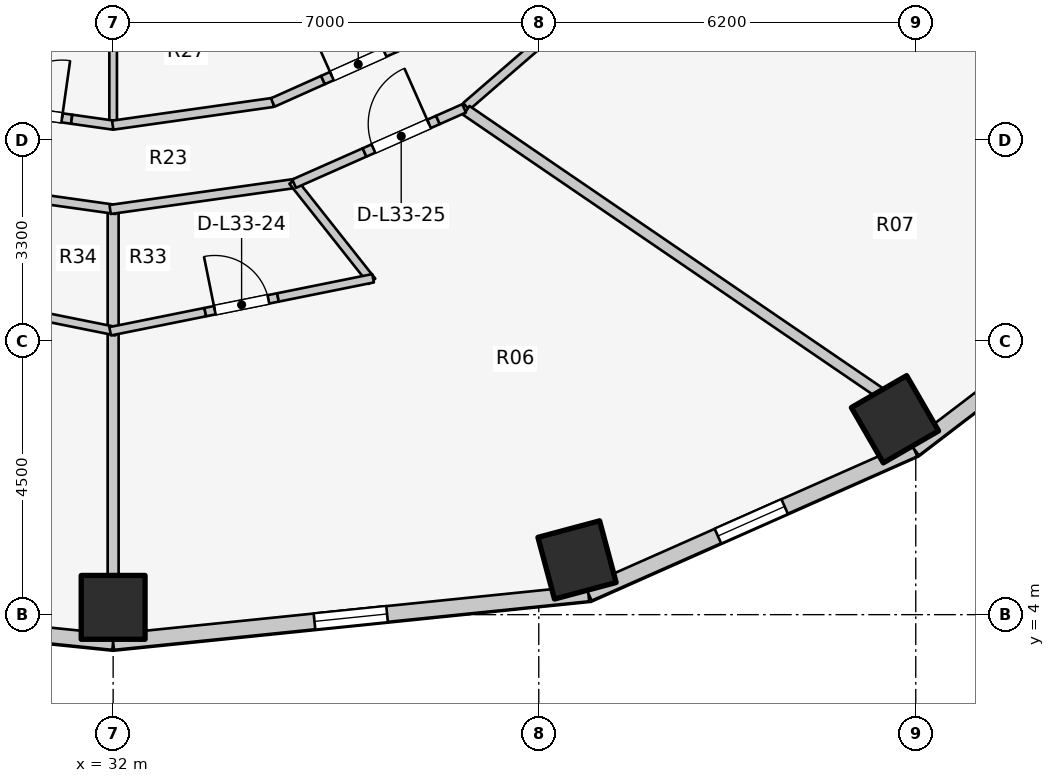
"""IFC4 building model, lengths in metres.
Left out: names, types, materials, properties, quantities, classifications, styles, units other than length and angle.
Written with IfcOpenShell. Run it as: python <this file> out.ifc"""

import sys

from ifc_helpers import new_model, si_unit, direction, frame, frame_2d, origin, origin_2d, place, context, subcontext, project, spatial, rectangle, extrude, element, fill, save


model = new_model("IFC4")
c1 = context("Model", 3, precision=1e-05, world=origin(), true_north=direction((0.0, 1.0)))
c2 = subcontext(c1, "Body", "Model", "MODEL_VIEW")
j1 = project(units=[si_unit("LENGTHUNIT", "METRE"), si_unit("PLANEANGLEUNIT", "RADIAN")], contexts=[c1])
p1 = place(None, origin())
s1 = spatial("IfcSite", under=j1, at=p1, CompositionType="ELEMENT")
p2 = place(p1, origin())
s2 = spatial("IfcBuilding", under=s1, at=p2, CompositionType="ELEMENT")
p3 = place(p2, frame((0.0, 0.0, 110.4)))
s3 = spatial("IfcBuildingStorey", under=s2, at=p3, CompositionType="ELEMENT", Elevation=110.4)
for number, where, z_axis, x_axis in (
    (1, (32.0, 4.12, 0.0), (0.0, 0.0, 1.0), (0.0, -1.0, 0.0)),
    (2, (39.629, 4.9, 0.0), (0.0, 0.0, 1.0), (0.259, -0.966, 0.0)),
    (3, (44.858, 7.214, 0.0), (0.0, 0.0, 1.0), (0.5, -0.866, 0.0)),
):
    element("IfcColumn", number, at=place(p3, frame(where, z_axis=z_axis, x_axis=x_axis)), inside=s3, PredefinedType="COLUMN", context=c2, shape_type="SweptSolid", body=[
        extrude(rectangle(XDim=1.05, YDim=1.05, at=origin_2d()), origin(), (0.0, 0.0, 1.0), 3.1),
    ])
p4 = place(p3, frame((24.184, 4.349, 0.0), z_axis=(0.0, 0.0, 1.0), x_axis=(0.994821390558, -0.101638579726, 0.0)))
e4 = element("IfcWall", 4, at=p4, inside=s3, PredefinedType="STANDARD", context=c2, shape_type="SweptSolid", body=[
    extrude(rectangle(XDim=7.857, YDim=0.26, at=frame_2d((3.929, 0.0))), origin(), (0.0, 0.0, 1.0), 1.22),
])
p5 = place(p4, frame((3.329, 0.0, 0.15)))
e5 = element("IfcOpeningElement", 5, at=p5, cuts=e4, PredefinedType="OPENING", context=c2, shape_type="SweptSolid", body=[
    extrude(rectangle(XDim=1.2, YDim=0.9, at=frame_2d((0.6, 0.45))), frame((0.0, 0.14, 0.0), z_axis=(0.0, -1.0, 0.0), x_axis=(1.0, 0.0, 0.0)), (0.0, 0.0, 1.0), 0.28),
])
p6 = place(p3, frame((32.0, 3.551, 0.0), z_axis=(0.0, 0.0, 1.0), x_axis=(0.994821390558, 0.101638579726, 0.0)))
e6 = element("IfcWall", 6, at=p6, inside=s3, PredefinedType="STANDARD", context=c2, shape_type="SweptSolid", body=[
    extrude(rectangle(XDim=7.857, YDim=0.26, at=frame_2d((3.929, 0.0))), origin(), (0.0, 0.0, 1.0), 1.22),
])
p7 = place(p6, frame((3.329, 0.0, 0.15)))
e7 = element("IfcOpeningElement", 7, at=p7, cuts=e6, PredefinedType="OPENING", context=c2, shape_type="SweptSolid", body=[
    extrude(rectangle(XDim=1.2, YDim=0.9, at=frame_2d((0.6, 0.45))), frame((0.0, 0.14, 0.0), z_axis=(0.0, -1.0, 0.0), x_axis=(1.0, 0.0, 0.0)), (0.0, 0.0, 1.0), 0.28),
])
p8 = place(p3, frame((39.816, 4.349, 0.0), z_axis=(0.0, 0.0, 1.0), x_axis=(0.914336605747, 0.404955023911, 0.0)))
e8 = element("IfcWall", 8, at=p8, inside=s3, PredefinedType="STANDARD", context=c2, shape_type="SweptSolid", body=[
    extrude(rectangle(XDim=5.859, YDim=0.26, at=frame_2d((2.929, 0.0))), origin(), (0.0, 0.0, 1.0), 1.22),
])
p9 = place(p8, frame((2.329, 0.0, 0.15)))
e9 = element("IfcOpeningElement", 9, at=p9, cuts=e8, PredefinedType="OPENING", context=c2, shape_type="SweptSolid", body=[
    extrude(rectangle(XDim=1.2, YDim=0.9, at=frame_2d((0.6, 0.45))), frame((0.0, 0.14, 0.0), z_axis=(0.0, -1.0, 0.0), x_axis=(1.0, 0.0, 0.0)), (0.0, 0.0, 1.0), 0.28),
])
p10 = place(p3, frame((45.173, 6.722, 0.0), z_axis=(0.0, 0.0, 1.0), x_axis=(0.794809810864, 0.606858603427, 0.0)))
e10 = element("IfcWall", 10, at=p10, inside=s3, PredefinedType="STANDARD", context=c2, shape_type="SweptSolid", body=[
    extrude(rectangle(XDim=5.149, YDim=0.26, at=frame_2d((2.575, 0.0))), origin(), (0.0, 0.0, 1.0), 1.22),
])
p11 = place(p3, frame((37.807, 12.358, 0.0), z_axis=(0.0, 0.0, 1.0), x_axis=(0.756055312247, 0.654507727092, 0.0)))
e11 = element("IfcWall", 11, at=p11, inside=s3, PredefinedType="PARTITIONING", context=c2, shape_type="SweptSolid", body=[
    extrude(rectangle(XDim=2.111, YDim=0.15, at=frame_2d((1.055, 0.0))), origin(), (0.0, 0.0, 1.0), 1.22),
])
p12 = place(p3, frame((32.0, 14.9, 0.0), z_axis=(0.0, 0.0, 1.0), x_axis=(0.0, -1.0, 0.0)))
e12 = element("IfcWall", 12, at=p12, inside=s3, PredefinedType="PARTITIONING", context=c2, shape_type="SweptSolid", body=[
    extrude(rectangle(XDim=2.85, YDim=0.125, at=frame_2d((1.425, 0.0))), origin(), (0.0, 0.0, 1.0), 1.22),
])
p13 = place(p3, frame((30.061, 12.326, 0.0), z_axis=(0.0, 0.0, 1.0), x_axis=(0.990102710588, -0.140344656064, 0.0)))
e13 = element("IfcWall", 13, at=p13, inside=s3, PredefinedType="PARTITIONING", context=c2, shape_type="SweptSolid", body=[
    extrude(rectangle(XDim=1.27, YDim=0.15, at=frame_2d((0.635, 0.0))), origin(), (0.0, 0.0, 1.0), 2.575),
])
p14 = place(p13, frame((0.16, 0.0, 0.0)))
e14 = element("IfcOpeningElement", 14, at=p14, cuts=e13, PredefinedType="OPENING", context=c2, shape_type="SweptSolid", body=[
    extrude(rectangle(XDim=0.95, YDim=2.1, at=frame_2d((0.475, 1.05))), frame((0.0, 0.085, 0.0), z_axis=(0.0, -1.0, 0.0), x_axis=(1.0, 0.0, 0.0)), (0.0, 0.0, 1.0), 0.17),
])
p15 = place(p3, frame((31.318, 12.148, 0.0), z_axis=(0.0, 0.0, 1.0), x_axis=(0.990110185172, -0.1402919143, 0.0)))
e15 = element("IfcWall", 15, at=p15, inside=s3, PredefinedType="PARTITIONING", context=c2, shape_type="SweptSolid", body=[
    extrude(rectangle(XDim=0.696, YDim=0.15, at=frame_2d((0.348, 0.0))), origin(), (0.0, 0.0, 1.0), 1.22),
])
p16 = place(p3, frame((31.993, 12.05, 0.0), z_axis=(0.0, 0.0, 1.0), x_axis=(0.990106619919, 0.140317073775, 0.0)))
e16 = element("IfcWall", 16, at=p16, inside=s3, PredefinedType="PARTITIONING", context=c2, shape_type="SweptSolid", body=[
    extrude(rectangle(XDim=2.662, YDim=0.15, at=frame_2d((1.331, 0.0))), origin(), (0.0, 0.0, 1.0), 1.22),
])
p17 = place(p3, frame((34.625, 12.423, 0.0), z_axis=(0.0, 0.0, 1.0), x_axis=(0.912863245368, 0.408265471546, 0.0)))
e17 = element("IfcWall", 17, at=p17, inside=s3, PredefinedType="PARTITIONING", context=c2, shape_type="SweptSolid", body=[
    extrude(rectangle(XDim=0.905, YDim=0.15, at=frame_2d((0.452, 0.0))), origin(), (0.0, 0.0, 1.0), 1.22),
])
p18 = place(p3, frame((35.451, 12.792, 0.0), z_axis=(0.0, 0.0, 1.0), x_axis=(0.91289745036, 0.408188982122, 0.0)))
e18 = element("IfcWall", 18, at=p18, inside=s3, PredefinedType="PARTITIONING", context=c2, shape_type="SweptSolid", body=[
    extrude(rectangle(XDim=1.27, YDim=0.15, at=frame_2d((0.635, 0.0))), origin(), (0.0, 0.0, 1.0), 2.16),
])
p19 = place(p18, frame((0.16, 0.0, 0.0)))
e19 = element("IfcOpeningElement", 19, at=p19, cuts=e18, PredefinedType="OPENING", context=c2, shape_type="SweptSolid", body=[
    extrude(rectangle(XDim=0.95, YDim=2.1, at=frame_2d((0.475, 1.05))), frame((0.0, 0.085, 0.0), z_axis=(0.0, -1.0, 0.0), x_axis=(1.0, 0.0, 0.0)), (0.0, 0.0, 1.0), 0.17),
])
p20 = place(p3, frame((36.61, 13.31, 0.0), z_axis=(0.0, 0.0, 1.0), x_axis=(0.912911125305, 0.40815839731, 0.0)))
e20 = element("IfcWall", 20, at=p20, inside=s3, PredefinedType="PARTITIONING", context=c2, shape_type="SweptSolid", body=[
    extrude(rectangle(XDim=0.516, YDim=0.15, at=frame_2d((0.258, 0.0))), origin(), (0.0, 0.0, 1.0), 2.575),
])
p21 = place(p3, frame((32.0, 10.615, 0.0), z_axis=(0.0, 0.0, 1.0), x_axis=(0.0, -1.0, 0.0)))
e21 = element("IfcWall", 21, at=p21, inside=s3, PredefinedType="PARTITIONING", context=c2, shape_type="SweptSolid", body=[
    extrude(rectangle(XDim=5.99, YDim=0.18, at=frame_2d((2.995, 0.0))), origin(), (0.0, 0.0, 1.0), 1.22),
])
p22 = place(p3, frame((37.81, 12.291, 0.0), z_axis=(0.0, 0.0, 1.0), x_axis=(0.825850521911, -0.563889098546, 0.0)))
e22 = element("IfcWall", 22, at=p22, inside=s3, PredefinedType="PARTITIONING", context=c2, shape_type="SweptSolid", body=[
    extrude(rectangle(XDim=8.228, YDim=0.18, at=frame_2d((4.114, 0.0))), origin(), (0.0, 0.0, 1.0), 1.22),
])
p23 = place(p3, frame((28.966, 11.097, 0.0), z_axis=(0.0, 0.0, 1.0), x_axis=(0.990234434447, -0.139412211929, 0.0)))
e23 = element("IfcWall", 23, at=p23, inside=s3, PredefinedType="PARTITIONING", context=c2, shape_type="SweptSolid", body=[
    extrude(rectangle(XDim=3.114, YDim=0.15, at=frame_2d((1.557, 0.0))), origin(), (0.0, 0.0, 1.0), 1.22),
])
p24 = place(p3, frame((30.485, 8.975, 0.0), z_axis=(0.0, 0.0, 1.0), x_axis=(0.980291218326, -0.197557908657, 0.0)))
e24 = element("IfcWall", 24, at=p24, inside=s3, PredefinedType="PLUMBINGWALL", context=c2, shape_type="SweptSolid", body=[
    extrude(rectangle(XDim=1.595, YDim=0.14, at=frame_2d((0.798, 0.0))), origin(), (0.0, 0.0, 1.0), 1.22),
])
p25 = place(p3, frame((31.95, 10.663, 0.0), z_axis=(0.0, 0.0, 1.0), x_axis=(0.990234434447, 0.139412211929, 0.0)))
e25 = element("IfcWall", 25, at=p25, inside=s3, PredefinedType="PARTITIONING", context=c2, shape_type="SweptSolid", body=[
    extrude(rectangle(XDim=3.114, YDim=0.15, at=frame_2d((1.557, 0.0))), origin(), (0.0, 0.0, 1.0), 1.22),
])
p26 = place(p3, frame((34.953, 11.129, 0.0), z_axis=(0.0, 0.0, 1.0), x_axis=(0.620702944366, -0.784045824462, 0.0)))
e26 = element("IfcWall", 26, at=p26, inside=s3, PredefinedType="PLUMBINGWALL", context=c2, shape_type="SweptSolid", body=[
    extrude(rectangle(XDim=2.1, YDim=0.14, at=frame_2d((1.05, 0.0))), origin(), (0.0, 0.0, 1.0), 2.105),
])
p27 = place(p3, frame((31.951, 8.66, 0.0), z_axis=(0.0, 0.0, 1.0), x_axis=(0.980291218326, 0.197557908657, 0.0)))
e27 = element("IfcWall", 27, at=p27, inside=s3, PredefinedType="PLUMBINGWALL", context=c2, shape_type="SweptSolid", body=[
    extrude(rectangle(XDim=1.595, YDim=0.14, at=frame_2d((0.798, 0.0))), origin(), (0.0, 0.0, 1.0), 1.22),
])
p28 = place(p3, frame((33.515, 8.975, 0.0), z_axis=(0.0, 0.0, 1.0), x_axis=(0.980256050043, 0.197732335125, 0.0)))
e28 = element("IfcWall", 28, at=p28, inside=s3, PredefinedType="PLUMBINGWALL", context=c2, shape_type="SweptSolid", body=[
    extrude(rectangle(XDim=1.22, YDim=0.14, at=frame_2d((0.61, 0.0))), origin(), (0.0, 0.0, 1.0), 2.575),
])
p29 = place(p28, frame((0.16, 0.0, 0.0)))
e29 = element("IfcOpeningElement", 29, at=p29, cuts=e28, PredefinedType="OPENING", context=c2, shape_type="SweptSolid", body=[
    extrude(rectangle(XDim=0.9, YDim=2.1, at=frame_2d((0.45, 1.05))), frame((0.0, 0.08, 0.0), z_axis=(0.0, -1.0, 0.0), x_axis=(1.0, 0.0, 0.0)), (0.0, 0.0, 1.0), 0.16),
])
p30 = place(p3, frame((34.711, 9.217, 0.0), z_axis=(0.0, 0.0, 1.0), x_axis=(0.980261572321, 0.197704956516, 0.0)))
e30 = element("IfcWall", 30, at=p30, inside=s3, PredefinedType="PLUMBINGWALL", context=c2, shape_type="SweptSolid", body=[
    extrude(rectangle(XDim=1.595, YDim=0.14, at=frame_2d((0.798, 0.0))), origin(), (0.0, 0.0, 1.0), 2.575),
])
p31 = place(p3, frame((34.976, 11.088, 0.0), z_axis=(0.0, 0.0, 1.0), x_axis=(0.914311660367, 0.405011342701, 0.0)))
e31 = element("IfcWall", 31, at=p31, inside=s3, PredefinedType="PARTITIONING", context=c2, shape_type="SweptSolid", body=[
    extrude(rectangle(XDim=1.267, YDim=0.15, at=frame_2d((0.633, 0.0))), origin(), (0.0, 0.0, 1.0), 1.22),
])
p32 = place(p3, frame((36.134, 11.601, 0.0), z_axis=(0.0, 0.0, 1.0), x_axis=(0.914314172667, 0.405005671145, 0.0)))
e32 = element("IfcWall", 32, at=p32, inside=s3, PredefinedType="PARTITIONING", context=c2, shape_type="SweptSolid", body=[
    extrude(rectangle(XDim=1.32, YDim=0.15, at=frame_2d((0.66, 0.0))), origin(), (0.0, 0.0, 1.0), 2.16),
])
p33 = place(p32, frame((0.16, 0.0, 0.0)))
e33 = element("IfcOpeningElement", 33, at=p33, cuts=e32, PredefinedType="OPENING", context=c2, shape_type="SweptSolid", body=[
    extrude(rectangle(XDim=1.0, YDim=2.1, at=frame_2d((0.5, 1.05))), frame((0.0, 0.085, 0.0), z_axis=(0.0, -1.0, 0.0), x_axis=(1.0, 0.0, 0.0)), (0.0, 0.0, 1.0), 0.17),
])
p34 = place(p3, frame((37.341, 12.135, 0.0), z_axis=(0.0, 0.0, 1.0), x_axis=(0.914387769504, 0.404839482983, 0.0)))
e34 = element("IfcWall", 34, at=p34, inside=s3, PredefinedType="PARTITIONING", context=c2, shape_type="SweptSolid", body=[
    extrude(rectangle(XDim=0.471, YDim=0.15, at=frame_2d((0.235, 0.0))), origin(), (0.0, 0.0, 1.0), 2.575),
])
p35 = place(p7, origin())
e35 = element("IfcWindow", 35, at=p35, inside=s3, PartitioningType="SINGLE_PANEL", PredefinedType="WINDOW", context=c2, shape_type="SweptSolid", body=[
    extrude(rectangle(XDim=1.2, YDim=0.9, at=frame_2d((0.6, 0.45))), frame((0.0, 0.03, 0.0), z_axis=(0.0, -1.0, 0.0), x_axis=(1.0, 0.0, 0.0)), (0.0, 0.0, 1.0), 0.06),
])
fill(e7, e35)
p36 = place(p9, origin())
e36 = element("IfcWindow", 36, at=p36, inside=s3, PartitioningType="SINGLE_PANEL", PredefinedType="WINDOW", context=c2, shape_type="SweptSolid", body=[
    extrude(rectangle(XDim=1.2, YDim=0.9, at=frame_2d((0.6, 0.45))), frame((0.0, 0.03, 0.0), z_axis=(0.0, -1.0, 0.0), x_axis=(1.0, 0.0, 0.0)), (0.0, 0.0, 1.0), 0.06),
])
fill(e9, e36)
p37 = place(p14, origin())
e37 = element("IfcDoor", 37, at=p37, inside=s3, OperationType="SINGLE_SWING_RIGHT", PredefinedType="DOOR", context=c2, shape_type="SweptSolid", body=[
    extrude(rectangle(XDim=0.95, YDim=2.1, at=frame_2d((0.475, 1.05))), frame((0.0, 0.025, 0.0), z_axis=(0.0, -1.0, 0.0), x_axis=(1.0, 0.0, 0.0)), (0.0, 0.0, 1.0), 0.05),
])
fill(e14, e37)
p38 = place(p19, origin())
e38 = element("IfcDoor", 38, at=p38, inside=s3, OperationType="SINGLE_SWING_LEFT", PredefinedType="DOOR", context=c2, shape_type="SweptSolid", body=[
    extrude(rectangle(XDim=0.95, YDim=2.1, at=frame_2d((0.475, 1.05))), frame((0.0, 0.025, 0.0), z_axis=(0.0, -1.0, 0.0), x_axis=(1.0, 0.0, 0.0)), (0.0, 0.0, 1.0), 0.05),
])
fill(e19, e38)
p39 = place(p29, origin())
e39 = element("IfcDoor", 39, at=p39, inside=s3, OperationType="SINGLE_SWING_LEFT", PredefinedType="DOOR", context=c2, shape_type="SweptSolid", body=[
    extrude(rectangle(XDim=0.9, YDim=2.1, at=frame_2d((0.45, 1.05))), frame((0.0, 0.025, 0.0), z_axis=(0.0, -1.0, 0.0), x_axis=(1.0, 0.0, 0.0)), (0.0, 0.0, 1.0), 0.05),
])
fill(e29, e39)
p40 = place(p33, origin())
e40 = element("IfcDoor", 40, at=p40, inside=s3, OperationType="SINGLE_SWING_RIGHT", PredefinedType="DOOR", context=c2, shape_type="SweptSolid", body=[
    extrude(rectangle(XDim=1.0, YDim=2.1, at=frame_2d((0.5, 1.05))), frame((0.0, 0.025, 0.0), z_axis=(0.0, -1.0, 0.0), x_axis=(1.0, 0.0, 0.0)), (0.0, 0.0, 1.0), 0.05),
])
fill(e33, e40)
save(model, sys.argv[1])
